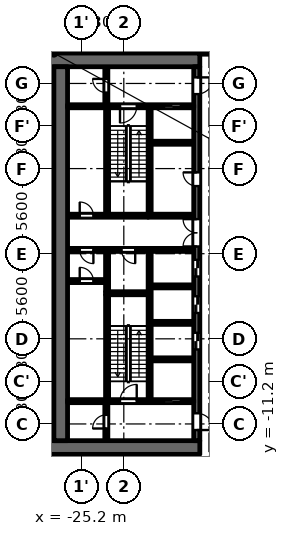
"""IFC4 building model, lengths in metres.
Left out: names, types, materials, properties, quantities, classifications, styles, units other than length and angle.
Written with IfcOpenShell. Run it as: python <this file> out.ifc"""

import sys

from ifc_helpers import new_model, si_unit, direction, frame, frame_2d, origin, place, context, subcontext, project, spatial, rectangle, extrude, element, fill, save


model = new_model("IFC4")
c1 = context("Model", 3, precision=1e-05, world=origin(), true_north=direction((0.0, 1.0)))
c2 = subcontext(c1, "Body", "Model", "MODEL_VIEW")
j1 = project(units=[si_unit("LENGTHUNIT", "METRE"), si_unit("PLANEANGLEUNIT", "RADIAN")], contexts=[c1])
p1 = place(None, origin())
s1 = spatial("IfcSite", under=j1, at=p1, CompositionType="ELEMENT")
p2 = place(p1, origin())
s2 = spatial("IfcBuilding", under=s1, at=p2, CompositionType="ELEMENT")
p3 = place(p2, frame((0.0, 0.0, 16.1)))
s3 = spatial("IfcBuildingStorey", under=s2, at=p3, CompositionType="ELEMENT", Elevation=16.1)
p4 = place(p3, frame((-23.5, -2.5, 0.0), z_axis=(0.0, 0.0, 1.0), x_axis=(0.0, 1.0, 0.0)))
e1 = element("IfcWall", 1, at=p4, inside=s3, PredefinedType="PARTITIONING", context=c2, shape_type="SweptSolid", body=[
    extrude(rectangle(XDim=2.65, YDim=0.2, at=frame_2d((1.325, 0.0))), origin(), (0.0, 0.0, 1.0), 4.45),
])
p5 = place(p3, frame((-20.7, 2.6, 0.0), z_axis=(0.0, 0.0, 1.0), x_axis=(0.0, 1.0, 0.0)))
e2 = element("IfcWall", 2, at=p5, inside=s3, PredefinedType="SHEAR", context=c2, shape_type="SweptSolid", body=[
    extrude(rectangle(XDim=7.0, YDim=0.2, at=frame_2d((3.5, 0.0))), origin(), (0.0, 0.0, 1.0), 4.45),
])
p6 = place(p3, frame((-20.7, -9.6, 0.0), z_axis=(0.0, 0.0, 1.0), x_axis=(0.0, 1.0, 0.0)))
e3 = element("IfcWall", 3, at=p6, inside=s3, PredefinedType="SHEAR", context=c2, shape_type="SweptSolid", body=[
    extrude(rectangle(XDim=9.75, YDim=0.2, at=frame_2d((4.875, 0.0))), origin(), (0.0, 0.0, 1.0), 4.45),
])
p7 = place(p3, frame((-20.8, 2.5, 0.0), z_axis=(0.0, 0.0, 1.0), x_axis=(-1.0, 0.0, 0.0)))
e4 = element("IfcWall", 4, at=p7, inside=s3, PredefinedType="SHEAR", context=c2, shape_type="SweptSolid", body=[
    extrude(rectangle(XDim=5.3, YDim=0.2, at=frame_2d((2.65, 0.0))), origin(), (0.0, 0.0, 1.0), 4.45),
])
p8 = place(p7, frame((3.6, 0.0, 0.0)))
e5 = element("IfcOpeningElement", 5, at=p8, cuts=e4, PredefinedType="OPENING", context=c2, shape_type="SweptSolid", body=[
    extrude(rectangle(XDim=0.9, YDim=2.1, at=frame_2d((0.45, 1.05))), frame((0.0, 0.11, 0.0), z_axis=(0.0, -1.0, 0.0), x_axis=(1.0, 0.0, 0.0)), (0.0, 0.0, 1.0), 0.22),
])
p9 = place(p3, frame((-20.8, 0.25, 0.0), z_axis=(0.0, 0.0, 1.0), x_axis=(-1.0, 0.0, 0.0)))
e6 = element("IfcWall", 6, at=p9, inside=s3, PredefinedType="PARTITIONING", context=c2, shape_type="SweptSolid", body=[
    extrude(rectangle(XDim=5.3, YDim=0.2, at=frame_2d((2.65, 0.0))), origin(), (0.0, 0.0, 1.0), 4.45),
])
p10 = place(p9, frame((0.85, 0.0, 0.0)))
e7 = element("IfcOpeningElement", 7, at=p10, cuts=e6, PredefinedType="OPENING", context=c2, shape_type="SweptSolid", body=[
    extrude(rectangle(XDim=0.9, YDim=2.1, at=frame_2d((0.45, 1.05))), frame((0.0, 0.11, 0.0), z_axis=(0.0, -1.0, 0.0), x_axis=(1.0, 0.0, 0.0)), (0.0, 0.0, 1.0), 0.22),
])
p11 = place(p9, frame((3.6, 0.0, 0.0)))
e8 = element("IfcOpeningElement", 8, at=p11, cuts=e6, PredefinedType="OPENING", context=c2, shape_type="SweptSolid", body=[
    extrude(rectangle(XDim=0.9, YDim=2.1, at=frame_2d((0.45, 1.05))), frame((0.0, 0.11, 0.0), z_axis=(0.0, -1.0, 0.0), x_axis=(1.0, 0.0, 0.0)), (0.0, 0.0, 1.0), 0.22),
])
for number, where, z_axis, x_axis in (
    (9, (-17.4, 12.75, 0.0), (0.0, 0.0, 1.0), (-1.0, 0.0, 0.0)),
    (10, (-17.4, -12.75, 0.0), (0.0, 0.0, 1.0), (-1.0, 0.0, 0.0)),
):
    element("IfcWall", number, at=place(p3, frame(where, z_axis=z_axis, x_axis=x_axis)), inside=s3, PredefinedType="SHEAR", context=c2, shape_type="SweptSolid", body=[
        extrude(rectangle(XDim=10.4, YDim=0.9, at=frame_2d((5.2, 0.0))), origin(), (0.0, 0.0, 1.0), 4.45),
    ])
p12 = place(p3, frame((-17.6, -12.3, 0.0), z_axis=(0.0, 0.0, 1.0), x_axis=(0.0, 1.0, 0.0)))
e11 = element("IfcWall", 11, at=p12, inside=s3, PredefinedType="SHEAR", context=c2, shape_type="SweptSolid", body=[
    extrude(rectangle(XDim=24.6, YDim=0.4, at=frame_2d((12.3, 0.0))), origin(), (0.0, 0.0, 1.0), 4.45),
])
p13 = place(p12, frame((6.0, 0.0, 0.0)))
e12 = element("IfcOpeningElement", 12, at=p13, cuts=e11, PredefinedType="OPENING", context=c2, shape_type="SweptSolid", body=[
    extrude(rectangle(XDim=1.1, YDim=2.1, at=frame_2d((0.55, 1.05))), frame((0.0, 0.21, 0.0), z_axis=(0.0, -1.0, 0.0), x_axis=(1.0, 0.0, 0.0)), (0.0, 0.0, 1.0), 0.42),
])
p14 = place(p12, frame((8.4, 0.0, 0.0)))
e13 = element("IfcOpeningElement", 13, at=p14, cuts=e11, PredefinedType="OPENING", context=c2, shape_type="SweptSolid", body=[
    extrude(rectangle(XDim=1.1, YDim=2.1, at=frame_2d((0.55, 1.05))), frame((0.0, 0.21, 0.0), z_axis=(0.0, -1.0, 0.0), x_axis=(1.0, 0.0, 0.0)), (0.0, 0.0, 1.0), 0.42),
])
p15 = place(p12, frame((10.8, 0.0, 0.0)))
e14 = element("IfcOpeningElement", 14, at=p15, cuts=e11, PredefinedType="OPENING", context=c2, shape_type="SweptSolid", body=[
    extrude(rectangle(XDim=1.1, YDim=2.1, at=frame_2d((0.55, 1.05))), frame((0.0, 0.21, 0.0), z_axis=(0.0, -1.0, 0.0), x_axis=(1.0, 0.0, 0.0)), (0.0, 0.0, 1.0), 0.42),
])
p16 = place(p12, frame((16.75, 0.0, 0.0)))
e15 = element("IfcOpeningElement", 15, at=p16, cuts=e11, PredefinedType="OPENING", context=c2, shape_type="SweptSolid", body=[
    extrude(rectangle(XDim=0.9, YDim=2.1, at=frame_2d((0.45, 1.05))), frame((0.0, 0.21, 0.0), z_axis=(0.0, -1.0, 0.0), x_axis=(1.0, 0.0, 0.0)), (0.0, 0.0, 1.0), 0.42),
])
p17 = place(p12, frame((22.8, 0.0, 0.0)))
e16 = element("IfcOpeningElement", 16, at=p17, cuts=e11, PredefinedType="OPENING", context=c2, shape_type="SweptSolid", body=[
    extrude(rectangle(XDim=1.1, YDim=2.1, at=frame_2d((0.55, 1.05))), frame((0.0, 0.21, 0.0), z_axis=(0.0, -1.0, 0.0), x_axis=(1.0, 0.0, 0.0)), (0.0, 0.0, 1.0), 0.42),
])
p18 = place(p12, frame((0.7, 0.0, 0.0)))
e17 = element("IfcOpeningElement", 17, at=p18, cuts=e11, PredefinedType="OPENING", context=c2, shape_type="SweptSolid", body=[
    extrude(rectangle(XDim=1.1, YDim=2.1, at=frame_2d((0.55, 1.05))), frame((0.0, 0.21, 0.0), z_axis=(0.0, -1.0, 0.0), x_axis=(1.0, 0.0, 0.0)), (0.0, 0.0, 1.0), 0.42),
])
p19 = place(p12, frame((12.775, 0.0, 0.0)))
e18 = element("IfcOpeningElement", 18, at=p19, cuts=e11, PredefinedType="OPENING", context=c2, shape_type="SweptSolid", body=[
    extrude(rectangle(XDim=1.8, YDim=2.1, at=frame_2d((0.9, 1.05))), frame((0.0, 0.21, 0.0), z_axis=(0.0, -1.0, 0.0), x_axis=(1.0, 0.0, 0.0)), (0.0, 0.0, 1.0), 0.42),
])
p20 = place(p3, frame((-26.55, -12.3, 0.0), z_axis=(0.0, 0.0, 1.0), x_axis=(0.0, 1.0, 0.0)))
e19 = element("IfcWall", 19, at=p20, inside=s3, PredefinedType="SHEAR", context=c2, shape_type="SweptSolid", body=[
    extrude(rectangle(XDim=24.6, YDim=0.9, at=frame_2d((12.3, 0.0))), origin(), (0.0, 0.0, 1.0), 4.45),
])
p21 = place(p3, frame((-23.55, 9.8, 0.0), z_axis=(0.0, 0.0, 1.0), x_axis=(0.0, 1.0, 0.0)))
e20 = element("IfcWall", 20, at=p21, inside=s3, PredefinedType="PARTITIONING", context=c2, shape_type="SweptSolid", body=[
    extrude(rectangle(XDim=2.5, YDim=0.2, at=frame_2d((1.25, 0.0))), origin(), (0.0, 0.0, 1.0), 4.45),
])
p22 = place(p21, frame((0.8, 0.0, 0.0)))
e21 = element("IfcOpeningElement", 21, at=p22, cuts=e20, PredefinedType="OPENING", context=c2, shape_type="SweptSolid", body=[
    extrude(rectangle(XDim=0.9, YDim=2.1, at=frame_2d((0.45, 1.05))), frame((0.0, 0.11, 0.0), z_axis=(0.0, -1.0, 0.0), x_axis=(1.0, 0.0, 0.0)), (0.0, 0.0, 1.0), 0.22),
])
p23 = place(p3, frame((-23.55, -12.3, 0.0), z_axis=(0.0, 0.0, 1.0), x_axis=(0.0, 1.0, 0.0)))
e22 = element("IfcWall", 22, at=p23, inside=s3, PredefinedType="PARTITIONING", context=c2, shape_type="SweptSolid", body=[
    extrude(rectangle(XDim=2.5, YDim=0.2, at=frame_2d((1.25, 0.0))), origin(), (0.0, 0.0, 1.0), 4.45),
])
p24 = place(p23, frame((0.8, 0.0, 0.0)))
e23 = element("IfcOpeningElement", 23, at=p24, cuts=e22, PredefinedType="OPENING", context=c2, shape_type="SweptSolid", body=[
    extrude(rectangle(XDim=0.9, YDim=2.1, at=frame_2d((0.45, 1.05))), frame((0.0, 0.11, 0.0), z_axis=(0.0, -1.0, 0.0), x_axis=(1.0, 0.0, 0.0)), (0.0, 0.0, 1.0), 0.22),
])
p25 = place(p3, frame((-23.6, -1.8, 0.0), z_axis=(0.0, 0.0, 1.0), x_axis=(-1.0, 0.0, 0.0)))
e24 = element("IfcWall", 24, at=p25, inside=s3, PredefinedType="PARTITIONING", context=c2, shape_type="SweptSolid", body=[
    extrude(rectangle(XDim=2.5, YDim=0.2, at=frame_2d((1.25, 0.0))), origin(), (0.0, 0.0, 1.0), 4.45),
])
p26 = place(p25, frame((0.8, 0.0, 0.0)))
e25 = element("IfcOpeningElement", 25, at=p26, cuts=e24, PredefinedType="OPENING", context=c2, shape_type="SweptSolid", body=[
    extrude(rectangle(XDim=0.9, YDim=2.1, at=frame_2d((0.45, 1.05))), frame((0.0, 0.11, 0.0), z_axis=(0.0, -1.0, 0.0), x_axis=(1.0, 0.0, 0.0)), (0.0, 0.0, 1.0), 0.22),
])
p27 = place(p3, frame((-17.8, -9.7, 0.0), z_axis=(0.0, 0.0, 1.0), x_axis=(-1.0, 0.0, 0.0)))
e26 = element("IfcWall", 26, at=p27, inside=s3, PredefinedType="SHEAR", context=c2, shape_type="SweptSolid", body=[
    extrude(rectangle(XDim=8.3, YDim=0.2, at=frame_2d((4.15, 0.0))), origin(), (0.0, 0.0, 1.0), 4.45),
])
p28 = place(p27, frame((0.85, 0.0, 0.0)))
e27 = element("IfcOpeningElement", 27, at=p28, cuts=e26, PredefinedType="OPENING", context=c2, shape_type="SweptSolid", body=[
    extrude(rectangle(XDim=1.1, YDim=2.1, at=frame_2d((0.55, 1.05))), frame((0.0, 0.11, 0.0), z_axis=(0.0, -1.0, 0.0), x_axis=(1.0, 0.0, 0.0)), (0.0, 0.0, 1.0), 0.22),
])
p29 = place(p27, frame((3.75, 0.0, 0.0)))
e28 = element("IfcOpeningElement", 28, at=p29, cuts=e26, PredefinedType="OPENING", context=c2, shape_type="SweptSolid", body=[
    extrude(rectangle(XDim=1.1, YDim=2.1, at=frame_2d((0.55, 1.05))), frame((0.0, 0.11, 0.0), z_axis=(0.0, -1.0, 0.0), x_axis=(1.0, 0.0, 0.0)), (0.0, 0.0, 1.0), 0.22),
])
for number, where, z_axis, x_axis in (
    (29, (-17.8, -6.95, 0.0), (0.0, 0.0, 1.0), (-1.0, 0.0, 0.0)),
    (30, (-17.8, -4.55, 0.0), (0.0, 0.0, 1.0), (-1.0, 0.0, 0.0)),
    (31, (-17.8, -2.15, 0.0), (0.0, 0.0, 1.0), (-1.0, 0.0, 0.0)),
):
    element("IfcWall", number, at=place(p3, frame(where, z_axis=z_axis, x_axis=x_axis)), inside=s3, PredefinedType="PARTITIONING", context=c2, shape_type="SweptSolid", body=[
        extrude(rectangle(XDim=2.8, YDim=0.2, at=frame_2d((1.4, 0.0))), origin(), (0.0, 0.0, 1.0), 4.45),
    ])
for number, where, z_axis, x_axis in (
    (32, (-17.8, 0.25, 0.0), (0.0, 0.0, 1.0), (-1.0, 0.0, 0.0)),
    (33, (-17.8, 2.5, 0.0), (0.0, 0.0, 1.0), (-1.0, 0.0, 0.0)),
):
    element("IfcWall", number, at=place(p3, frame(where, z_axis=z_axis, x_axis=x_axis)), inside=s3, PredefinedType="PARTITIONING", context=c2, shape_type="SweptSolid", body=[
        extrude(rectangle(XDim=3.0, YDim=0.2, at=frame_2d((1.5, 0.0))), origin(), (0.0, 0.0, 1.0), 4.45),
    ])
p30 = place(p3, frame((-17.8, 7.3, 0.0), z_axis=(0.0, 0.0, 1.0), x_axis=(-1.0, 0.0, 0.0)))
e34 = element("IfcWall", 34, at=p30, inside=s3, PredefinedType="PARTITIONING", context=c2, shape_type="SweptSolid", body=[
    extrude(rectangle(XDim=2.8, YDim=0.2, at=frame_2d((1.4, 0.0))), origin(), (0.0, 0.0, 1.0), 4.45),
])
p31 = place(p3, frame((-17.8, 9.7, 0.0), z_axis=(0.0, 0.0, 1.0), x_axis=(-1.0, 0.0, 0.0)))
e35 = element("IfcWall", 35, at=p31, inside=s3, PredefinedType="SHEAR", context=c2, shape_type="SweptSolid", body=[
    extrude(rectangle(XDim=8.3, YDim=0.2, at=frame_2d((4.15, 0.0))), origin(), (0.0, 0.0, 1.0), 4.45),
])
p32 = place(p31, frame((0.85, 0.0, 0.0)))
e36 = element("IfcOpeningElement", 36, at=p32, cuts=e35, PredefinedType="OPENING", context=c2, shape_type="SweptSolid", body=[
    extrude(rectangle(XDim=1.1, YDim=2.1, at=frame_2d((0.55, 1.05))), frame((0.0, 0.11, 0.0), z_axis=(0.0, -1.0, 0.0), x_axis=(1.0, 0.0, 0.0)), (0.0, 0.0, 1.0), 0.22),
])
p33 = place(p31, frame((3.75, 0.0, 0.0)))
e37 = element("IfcOpeningElement", 37, at=p33, cuts=e35, PredefinedType="OPENING", context=c2, shape_type="SweptSolid", body=[
    extrude(rectangle(XDim=1.1, YDim=2.1, at=frame_2d((0.55, 1.05))), frame((0.0, 0.11, 0.0), z_axis=(0.0, -1.0, 0.0), x_axis=(1.0, 0.0, 0.0)), (0.0, 0.0, 1.0), 0.22),
])
p34 = place(p3, frame((-23.5, 2.6, 0.0), z_axis=(0.0, 0.0, 1.0), x_axis=(0.0, 1.0, 0.0)))
e38 = element("IfcWall", 38, at=p34, inside=s3, PredefinedType="SHEAR", context=c2, shape_type="SweptSolid", body=[
    extrude(rectangle(XDim=7.0, YDim=0.2, at=frame_2d((3.5, 0.0))), origin(), (0.0, 0.0, 1.0), 4.45),
])
p35 = place(p3, frame((-23.5, -9.6, 0.0), z_axis=(0.0, 0.0, 1.0), x_axis=(0.0, 1.0, 0.0)))
e39 = element("IfcWall", 39, at=p35, inside=s3, PredefinedType="SHEAR", context=c2, shape_type="SweptSolid", body=[
    extrude(rectangle(XDim=6.9, YDim=0.2, at=frame_2d((3.45, 0.0))), origin(), (0.0, 0.0, 1.0), 4.45),
])
p36 = place(p3, frame((-20.8, -2.6, 0.0), z_axis=(0.0, 0.0, 1.0), x_axis=(-1.0, 0.0, 0.0)))
e40 = element("IfcWall", 40, at=p36, inside=s3, PredefinedType="SHEAR", context=c2, shape_type="SweptSolid", body=[
    extrude(rectangle(XDim=2.8, YDim=0.2, at=frame_2d((1.4, 0.0))), origin(), (0.0, 0.0, 1.0), 4.45),
])
p37 = place(p3, frame((-17.4, 13.2, 0.0), z_axis=(0.0, 0.0, 1.0), x_axis=(1.0, 0.0, 0.0)))
e41 = element("IfcWall", 41, at=p37, inside=s3, PredefinedType="PARTITIONING", context=c2, shape_type="SweptSolid", body=[
    extrude(rectangle(XDim=34.8, YDim=0.15, at=frame_2d((17.4, 0.0))), origin(), (0.0, 0.0, 1.0), 4.45),
])
p38 = place(p37, frame((3.05, 0.0, 0.0)))
e42 = element("IfcOpeningElement", 42, at=p38, cuts=e41, PredefinedType="OPENING", context=c2, shape_type="SweptSolid", body=[
    extrude(rectangle(XDim=1.8, YDim=2.1, at=frame_2d((0.9, 1.05))), frame((0.0, 0.085, 0.0), z_axis=(0.0, -1.0, 0.0), x_axis=(1.0, 0.0, 0.0)), (0.0, 0.0, 1.0), 0.17),
])
p39 = place(p37, frame((0.75, 0.0, 0.0)))
e43 = element("IfcOpeningElement", 43, at=p39, cuts=e41, PredefinedType="OPENING", context=c2, shape_type="SweptSolid", body=[
    extrude(rectangle(XDim=1.0, YDim=2.1, at=frame_2d((0.5, 1.05))), frame((0.0, 0.085, 0.0), z_axis=(0.0, -1.0, 0.0), x_axis=(1.0, 0.0, 0.0)), (0.0, 0.0, 1.0), 0.17),
])
p40 = place(p37, frame((33.15, 0.0, 0.0)))
e44 = element("IfcOpeningElement", 44, at=p40, cuts=e41, PredefinedType="OPENING", context=c2, shape_type="SweptSolid", body=[
    extrude(rectangle(XDim=1.0, YDim=2.1, at=frame_2d((0.5, 1.05))), frame((0.0, 0.085, 0.0), z_axis=(0.0, -1.0, 0.0), x_axis=(1.0, 0.0, 0.0)), (0.0, 0.0, 1.0), 0.17),
])
p41 = place(p28, origin())
e45 = element("IfcDoor", 45, at=p41, inside=s3, OperationType="DOUBLE_DOOR_SLIDING", PredefinedType="DOOR", context=c2, shape_type="SweptSolid", body=[
    extrude(rectangle(XDim=1.1, YDim=2.1, at=frame_2d((0.55, 1.05))), frame((0.0, 0.025, 0.0), z_axis=(0.0, -1.0, 0.0), x_axis=(1.0, 0.0, 0.0)), (0.0, 0.0, 1.0), 0.05),
])
fill(e27, e45)
p42 = place(p13, origin())
e46 = element("IfcDoor", 46, at=p42, inside=s3, OperationType="DOUBLE_DOOR_SLIDING", PredefinedType="DOOR", context=c2, shape_type="SweptSolid", body=[
    extrude(rectangle(XDim=1.1, YDim=2.1, at=frame_2d((0.55, 1.05))), frame((0.0, 0.025, 0.0), z_axis=(0.0, -1.0, 0.0), x_axis=(1.0, 0.0, 0.0)), (0.0, 0.0, 1.0), 0.05),
])
fill(e12, e46)
p43 = place(p14, origin())
e47 = element("IfcDoor", 47, at=p43, inside=s3, OperationType="DOUBLE_DOOR_SLIDING", PredefinedType="DOOR", context=c2, shape_type="SweptSolid", body=[
    extrude(rectangle(XDim=1.1, YDim=2.1, at=frame_2d((0.55, 1.05))), frame((0.0, 0.025, 0.0), z_axis=(0.0, -1.0, 0.0), x_axis=(1.0, 0.0, 0.0)), (0.0, 0.0, 1.0), 0.05),
])
fill(e13, e47)
p44 = place(p15, origin())
e48 = element("IfcDoor", 48, at=p44, inside=s3, OperationType="DOUBLE_DOOR_SLIDING", PredefinedType="DOOR", context=c2, shape_type="SweptSolid", body=[
    extrude(rectangle(XDim=1.1, YDim=2.1, at=frame_2d((0.55, 1.05))), frame((0.0, 0.025, 0.0), z_axis=(0.0, -1.0, 0.0), x_axis=(1.0, 0.0, 0.0)), (0.0, 0.0, 1.0), 0.05),
])
fill(e14, e48)
p45 = place(p16, origin())
e49 = element("IfcDoor", 49, at=p45, inside=s3, OperationType="SINGLE_SWING_LEFT", PredefinedType="DOOR", context=c2, shape_type="SweptSolid", body=[
    extrude(rectangle(XDim=0.9, YDim=2.1, at=frame_2d((0.45, 1.05))), frame((0.0, 0.025, 0.0), z_axis=(0.0, -1.0, 0.0), x_axis=(1.0, 0.0, 0.0)), (0.0, 0.0, 1.0), 0.05),
])
fill(e15, e49)
p46 = place(p32, origin())
e50 = element("IfcDoor", 50, at=p46, inside=s3, OperationType="DOUBLE_DOOR_SLIDING", PredefinedType="DOOR", context=c2, shape_type="SweptSolid", body=[
    extrude(rectangle(XDim=1.1, YDim=2.1, at=frame_2d((0.55, 1.05))), frame((0.0, 0.025, 0.0), z_axis=(0.0, -1.0, 0.0), x_axis=(1.0, 0.0, 0.0)), (0.0, 0.0, 1.0), 0.05),
])
fill(e36, e50)
p47 = place(p17, origin())
e51 = element("IfcDoor", 51, at=p47, inside=s3, OperationType="SINGLE_SWING_RIGHT", PredefinedType="DOOR", context=c2, shape_type="SweptSolid", body=[
    extrude(rectangle(XDim=1.1, YDim=2.1, at=frame_2d((0.55, 1.05))), frame((0.0, 0.025, 0.0), z_axis=(0.0, -1.0, 0.0), x_axis=(1.0, 0.0, 0.0)), (0.0, 0.0, 1.0), 0.05),
])
fill(e16, e51)
p48 = place(p18, origin())
e52 = element("IfcDoor", 52, at=p48, inside=s3, OperationType="SINGLE_SWING_LEFT", PredefinedType="DOOR", context=c2, shape_type="SweptSolid", body=[
    extrude(rectangle(XDim=1.1, YDim=2.1, at=frame_2d((0.55, 1.05))), frame((0.0, 0.025, 0.0), z_axis=(0.0, -1.0, 0.0), x_axis=(1.0, 0.0, 0.0)), (0.0, 0.0, 1.0), 0.05),
])
fill(e17, e52)
p49 = place(p22, origin())
e53 = element("IfcDoor", 53, at=p49, inside=s3, OperationType="SINGLE_SWING_LEFT", PredefinedType="DOOR", context=c2, shape_type="SweptSolid", body=[
    extrude(rectangle(XDim=0.9, YDim=2.1, at=frame_2d((0.45, 1.05))), frame((0.0, 0.025, 0.0), z_axis=(0.0, -1.0, 0.0), x_axis=(1.0, 0.0, 0.0)), (0.0, 0.0, 1.0), 0.05),
])
fill(e21, e53)
p50 = place(p24, origin())
e54 = element("IfcDoor", 54, at=p50, inside=s3, OperationType="SINGLE_SWING_RIGHT", PredefinedType="DOOR", context=c2, shape_type="SweptSolid", body=[
    extrude(rectangle(XDim=0.9, YDim=2.1, at=frame_2d((0.45, 1.05))), frame((0.0, 0.025, 0.0), z_axis=(0.0, -1.0, 0.0), x_axis=(1.0, 0.0, 0.0)), (0.0, 0.0, 1.0), 0.05),
])
fill(e23, e54)
p51 = place(p33, origin())
e55 = element("IfcDoor", 55, at=p51, inside=s3, OperationType="SINGLE_SWING_LEFT", PredefinedType="DOOR", context=c2, shape_type="SweptSolid", body=[
    extrude(rectangle(XDim=1.1, YDim=2.1, at=frame_2d((0.55, 1.05))), frame((0.0, 0.025, 0.0), z_axis=(0.0, -1.0, 0.0), x_axis=(1.0, 0.0, 0.0)), (0.0, 0.0, 1.0), 0.05),
])
fill(e37, e55)
p52 = place(p29, origin())
e56 = element("IfcDoor", 56, at=p52, inside=s3, OperationType="SINGLE_SWING_LEFT", PredefinedType="DOOR", context=c2, shape_type="SweptSolid", body=[
    extrude(rectangle(XDim=1.1, YDim=2.1, at=frame_2d((0.55, 1.05))), frame((0.0, 0.025, 0.0), z_axis=(0.0, -1.0, 0.0), x_axis=(1.0, 0.0, 0.0)), (0.0, 0.0, 1.0), 0.05),
])
fill(e28, e56)
p53 = place(p19, origin())
e57 = element("IfcDoor", 57, at=p53, inside=s3, OperationType="DOUBLE_DOOR_SINGLE_SWING", PredefinedType="DOOR", context=c2, shape_type="SweptSolid", body=[
    extrude(rectangle(XDim=1.8, YDim=2.1, at=frame_2d((0.9, 1.05))), frame((0.0, 0.025, 0.0), z_axis=(0.0, -1.0, 0.0), x_axis=(1.0, 0.0, 0.0)), (0.0, 0.0, 1.0), 0.05),
])
fill(e18, e57)
p54 = place(p10, origin())
e58 = element("IfcDoor", 58, at=p54, inside=s3, OperationType="SINGLE_SWING_RIGHT", PredefinedType="DOOR", context=c2, shape_type="SweptSolid", body=[
    extrude(rectangle(XDim=0.9, YDim=2.1, at=frame_2d((0.45, 1.05))), frame((0.0, 0.025, 0.0), z_axis=(0.0, -1.0, 0.0), x_axis=(1.0, 0.0, 0.0)), (0.0, 0.0, 1.0), 0.05),
])
fill(e7, e58)
p55 = place(p26, origin())
e59 = element("IfcDoor", 59, at=p55, inside=s3, OperationType="SINGLE_SWING_RIGHT", PredefinedType="DOOR", context=c2, shape_type="SweptSolid", body=[
    extrude(rectangle(XDim=0.9, YDim=2.1, at=frame_2d((0.45, 1.05))), frame((0.0, 0.025, 0.0), z_axis=(0.0, -1.0, 0.0), x_axis=(1.0, 0.0, 0.0)), (0.0, 0.0, 1.0), 0.05),
])
fill(e25, e59)
p56 = place(p11, origin())
e60 = element("IfcDoor", 60, at=p56, inside=s3, OperationType="SINGLE_SWING_RIGHT", PredefinedType="DOOR", context=c2, shape_type="SweptSolid", body=[
    extrude(rectangle(XDim=0.9, YDim=2.1, at=frame_2d((0.45, 1.05))), frame((0.0, 0.025, 0.0), z_axis=(0.0, -1.0, 0.0), x_axis=(1.0, 0.0, 0.0)), (0.0, 0.0, 1.0), 0.05),
])
fill(e8, e60)
p57 = place(p8, origin())
e61 = element("IfcDoor", 61, at=p57, inside=s3, OperationType="SINGLE_SWING_RIGHT", PredefinedType="DOOR", context=c2, shape_type="SweptSolid", body=[
    extrude(rectangle(XDim=0.9, YDim=2.1, at=frame_2d((0.45, 1.05))), frame((0.0, 0.025, 0.0), z_axis=(0.0, -1.0, 0.0), x_axis=(1.0, 0.0, 0.0)), (0.0, 0.0, 1.0), 0.05),
])
fill(e5, e61)
save(model, sys.argv[1])
